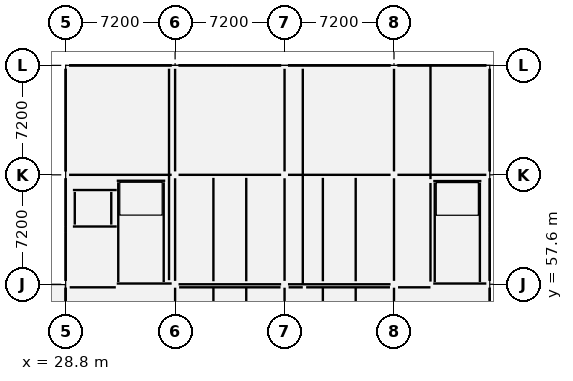
"""IFC4 building model, lengths in metres.
Left out: names, types, materials, properties, quantities, classifications, styles, units other than length and angle.
Written with IfcOpenShell. Run it as: python <this file> out.ifc"""

import sys

from ifc_helpers import new_model, si_unit, direction, frame, frame_2d, origin, origin_2d, place, context, subcontext, project, spatial, rectangle, extrude, element, fill, save


model = new_model("IFC4")
c1 = context("Model", 3, precision=1e-05, world=origin(), true_north=direction((0.0, 1.0)))
c2 = subcontext(c1, "Body", "Model", "MODEL_VIEW")
j1 = project(units=[si_unit("LENGTHUNIT", "METRE"), si_unit("PLANEANGLEUNIT", "RADIAN")], contexts=[c1])
p1 = place(None, origin())
s1 = spatial("IfcSite", under=j1, at=p1, CompositionType="ELEMENT")
p2 = place(p1, origin())
s2 = spatial("IfcBuilding", under=s1, at=p2, CompositionType="ELEMENT")
p3 = place(p2, frame((0.0, 0.0, 5.4)))
s3 = spatial("IfcBuildingStorey", under=s2, at=p3, CompositionType="ELEMENT", Elevation=5.4)
for number, where, z_axis, x_axis in (
    (1, (28.8, 57.6, 0.0), (0.0, 0.0, 1.0), (1.0, 0.0, 0.0)),
    (2, (28.8, 64.8, 0.0), (0.0, 0.0, 1.0), (1.0, 0.0, 0.0)),
    (3, (28.8, 72.0, 0.0), (0.0, 0.0, 1.0), (1.0, 0.0, 0.0)),
    (4, (36.0, 57.6, 0.0), (0.0, 0.0, 1.0), (1.0, 0.0, 0.0)),
    (5, (36.0, 64.8, 0.0), (0.0, 0.0, 1.0), (1.0, 0.0, 0.0)),
    (6, (36.0, 72.0, 0.0), (0.0, 0.0, 1.0), (1.0, 0.0, 0.0)),
    (7, (43.2, 57.6, 0.0), (0.0, 0.0, 1.0), (1.0, 0.0, 0.0)),
    (8, (43.2, 64.8, 0.0), (0.0, 0.0, 1.0), (1.0, 0.0, 0.0)),
    (9, (43.2, 72.0, 0.0), (0.0, 0.0, 1.0), (1.0, 0.0, 0.0)),
    (10, (50.4, 57.6, 0.0), (0.0, 0.0, 1.0), (1.0, 0.0, 0.0)),
    (11, (50.4, 64.8, 0.0), (0.0, 0.0, 1.0), (1.0, 0.0, 0.0)),
    (12, (50.4, 72.0, 0.0), (0.0, 0.0, 1.0), (1.0, 0.0, 0.0)),
    (13, (56.7, 57.6, 0.0), (0.0, 0.0, 1.0), (1.0, 0.0, 0.0)),
    (14, (56.7, 64.8, 0.0), (0.0, 0.0, 1.0), (1.0, 0.0, 0.0)),
    (15, (56.7, 72.0, 0.0), (0.0, 0.0, 1.0), (1.0, 0.0, 0.0)),
):
    element("IfcColumn", number, at=place(p3, frame(where, z_axis=z_axis, x_axis=x_axis)), inside=s3, PredefinedType="COLUMN", context=c2, shape_type="SweptSolid", body=[
        extrude(rectangle(XDim=0.45, YDim=0.45, at=origin_2d()), origin(), (0.0, 0.0, 1.0), 4.2),
    ])
p4 = place(p3, frame((29.275, 61.4, 0.0), z_axis=(0.0, 0.0, 1.0), x_axis=(1.0, 0.0, 0.0)))
e16 = element("IfcWall", 16, at=p4, inside=s3, PredefinedType="SHEAR", context=c2, shape_type="SweptSolid", body=[
    extrude(rectangle(XDim=2.885, YDim=0.25, at=frame_2d((1.442, 0.0))), origin(), (0.0, 0.0, 1.0), 3.95),
])
p5 = place(p4, frame((0.942, 0.0, 0.0)))
e17 = element("IfcOpeningElement", 17, at=p5, cuts=e16, PredefinedType="OPENING", context=c2, shape_type="SweptSolid", body=[
    extrude(rectangle(XDim=1.0, YDim=2.1, at=frame_2d((0.5, 1.05))), frame((0.0, 0.137, 0.0), z_axis=(0.0, -1.0, 0.0), x_axis=(1.0, 0.0, 0.0)), (0.0, 0.0, 1.0), 0.274),
])
p6 = place(p3, frame((29.275, 63.8, 0.0), z_axis=(0.0, 0.0, 1.0), x_axis=(1.0, 0.0, 0.0)))
e18 = element("IfcWall", 18, at=p6, inside=s3, PredefinedType="SHEAR", context=c2, shape_type="SweptSolid", body=[
    extrude(rectangle(XDim=2.885, YDim=0.25, at=frame_2d((1.442, 0.0))), origin(), (0.0, 0.0, 1.0), 3.95),
])
for number, where, z_axis, x_axis in (
    (19, (29.4, 61.525, 0.0), (0.0, 0.0, 1.0), (0.0, 1.0, 0.0)),
    (20, (31.8, 61.525, 0.0), (0.0, 0.0, 1.0), (0.0, 1.0, 0.0)),
):
    element("IfcWall", number, at=place(p3, frame(where, z_axis=z_axis, x_axis=x_axis)), inside=s3, PredefinedType="SHEAR", context=c2, shape_type="SweptSolid", body=[
        extrude(rectangle(XDim=2.15, YDim=0.25, at=frame_2d((1.075, 0.0))), origin(), (0.0, 0.0, 1.0), 3.95),
    ])
p7 = place(p3, frame((32.16, 57.65, 0.0), z_axis=(0.0, 0.0, 1.0), x_axis=(1.0, 0.0, 0.0)))
e21 = element("IfcWall", 21, at=p7, inside=s3, PredefinedType="SHEAR", context=c2, shape_type="SweptSolid", body=[
    extrude(rectangle(XDim=3.615, YDim=0.2, at=frame_2d((1.808, 0.0))), origin(), (0.0, 0.0, 1.0), 3.95),
])
p8 = place(p7, frame((1.258, 0.0, 0.0)))
e22 = element("IfcOpeningElement", 22, at=p8, cuts=e21, PredefinedType="OPENING", context=c2, shape_type="SweptSolid", body=[
    extrude(rectangle(XDim=1.1, YDim=2.15, at=frame_2d((0.55, 1.075))), frame((0.0, 0.112, 0.0), z_axis=(0.0, -1.0, 0.0), x_axis=(1.0, 0.0, 0.0)), (0.0, 0.0, 1.0), 0.224),
])
p9 = place(p3, frame((32.16, 64.41, 0.0), z_axis=(0.0, 0.0, 1.0), x_axis=(1.0, 0.0, 0.0)))
e23 = element("IfcWall", 23, at=p9, inside=s3, PredefinedType="SHEAR", context=c2, shape_type="SweptSolid", body=[
    extrude(rectangle(XDim=3.19, YDim=0.2, at=frame_2d((1.595, 0.0))), origin(), (0.0, 0.0, 1.0), 3.95),
])
for number, where, z_axis, x_axis in (
    (24, (32.26, 57.75, 0.0), (0.0, 0.0, 1.0), (0.0, 1.0, 0.0)),
    (25, (35.25, 57.75, 0.0), (0.0, 0.0, 1.0), (0.0, 1.0, 0.0)),
):
    element("IfcWall", number, at=place(p3, frame(where, z_axis=z_axis, x_axis=x_axis)), inside=s3, PredefinedType="SHEAR", context=c2, shape_type="SweptSolid", body=[
        extrude(rectangle(XDim=6.56, YDim=0.2, at=frame_2d((3.28, 0.0))), origin(), (0.0, 0.0, 1.0), 3.95),
    ])
p10 = place(p3, frame((52.98, 57.65, 0.0), z_axis=(0.0, 0.0, 1.0), x_axis=(1.0, 0.0, 0.0)))
e26 = element("IfcWall", 26, at=p10, inside=s3, PredefinedType="SHEAR", context=c2, shape_type="SweptSolid", body=[
    extrude(rectangle(XDim=3.495, YDim=0.2, at=frame_2d((1.748, 0.0))), origin(), (0.0, 0.0, 1.0), 3.95),
])
p11 = place(p10, frame((1.198, 0.0, 0.0)))
e27 = element("IfcOpeningElement", 27, at=p11, cuts=e26, PredefinedType="OPENING", context=c2, shape_type="SweptSolid", body=[
    extrude(rectangle(XDim=1.1, YDim=2.15, at=frame_2d((0.55, 1.075))), frame((0.0, 0.112, 0.0), z_axis=(0.0, -1.0, 0.0), x_axis=(1.0, 0.0, 0.0)), (0.0, 0.0, 1.0), 0.224),
])
p12 = place(p3, frame((52.98, 64.39, 0.0), z_axis=(0.0, 0.0, 1.0), x_axis=(1.0, 0.0, 0.0)))
e28 = element("IfcWall", 28, at=p12, inside=s3, PredefinedType="SHEAR", context=c2, shape_type="SweptSolid", body=[
    extrude(rectangle(XDim=3.17, YDim=0.2, at=frame_2d((1.585, 0.0))), origin(), (0.0, 0.0, 1.0), 3.95),
])
for number, where, z_axis, x_axis in (
    (29, (53.08, 57.75, 0.0), (0.0, 0.0, 1.0), (0.0, 1.0, 0.0)),
    (30, (56.05, 57.75, 0.0), (0.0, 0.0, 1.0), (0.0, 1.0, 0.0)),
):
    element("IfcWall", number, at=place(p3, frame(where, z_axis=z_axis, x_axis=x_axis)), inside=s3, PredefinedType="SHEAR", context=c2, shape_type="SweptSolid", body=[
        extrude(rectangle(XDim=6.54, YDim=0.2, at=frame_2d((3.27, 0.0))), origin(), (0.0, 0.0, 1.0), 3.95),
    ])
p13 = place(p3, frame((56.7, 61.0, 0.0), z_axis=(0.0, 0.0, 1.0), x_axis=(0.0, 1.0, 0.0)))
e31 = element("IfcWall", 31, at=p13, inside=s3, PredefinedType="SOLIDWALL", context=c2, shape_type="SweptSolid", body=[
    extrude(rectangle(XDim=0.4, YDim=0.36, at=frame_2d((0.2, 0.0))), origin(), (0.0, 0.0, 1.0), 3.34),
])
p14 = place(p3, frame((56.7, 68.2, 0.0), z_axis=(0.0, 0.0, 1.0), x_axis=(0.0, 1.0, 0.0)))
e32 = element("IfcWall", 32, at=p14, inside=s3, PredefinedType="SOLIDWALL", context=c2, shape_type="SweptSolid", body=[
    extrude(rectangle(XDim=0.4, YDim=0.36, at=frame_2d((0.2, 0.0))), origin(), (0.0, 0.0, 1.0), 3.29),
])
p15 = place(p3, frame((53.75, 72.0, 0.0), z_axis=(0.0, 0.0, 1.0), x_axis=(-1.0, 0.0, 0.0)))
e33 = element("IfcWall", 33, at=p15, inside=s3, PredefinedType="SOLIDWALL", context=c2, shape_type="SweptSolid", body=[
    extrude(rectangle(XDim=0.4, YDim=0.36, at=frame_2d((0.2, 0.0))), origin(), (0.0, 0.0, 1.0), 3.29),
])
p16 = place(p3, frame((50.175, 72.0, 0.0), z_axis=(0.0, 0.0, 1.0), x_axis=(-1.0, 0.0, 0.0)))
e34 = element("IfcWall", 34, at=p16, inside=s3, PredefinedType="ELEMENTEDWALL", context=c2, shape_type="SweptSolid", body=[
    extrude(rectangle(XDim=6.75, YDim=0.32, at=frame_2d((3.375, 0.0))), origin(), (0.0, 0.0, 1.0), 3.29),
])
p17 = place(p16, frame((2.775, 0.0, 0.85)))
e35 = element("IfcOpeningElement", 35, at=p17, cuts=e34, PredefinedType="OPENING", context=c2, shape_type="SweptSolid", body=[
    extrude(rectangle(XDim=1.2, YDim=2.2, at=frame_2d((0.6, 1.1))), frame((0.0, 0.172, 0.0), z_axis=(0.0, -1.0, 0.0), x_axis=(1.0, 0.0, 0.0)), (0.0, 0.0, 1.0), 0.344),
])
p18 = place(p3, frame((39.8, 72.0, 0.0), z_axis=(0.0, 0.0, 1.0), x_axis=(-1.0, 0.0, 0.0)))
e36 = element("IfcWall", 36, at=p18, inside=s3, PredefinedType="SOLIDWALL", context=c2, shape_type="SweptSolid", body=[
    extrude(rectangle(XDim=0.4, YDim=0.36, at=frame_2d((0.2, 0.0))), origin(), (0.0, 0.0, 1.0), 3.29),
])
p19 = place(p3, frame((35.775, 72.0, 0.0), z_axis=(0.0, 0.0, 1.0), x_axis=(-1.0, 0.0, 0.0)))
e37 = element("IfcWall", 37, at=p19, inside=s3, PredefinedType="ELEMENTEDWALL", context=c2, shape_type="SweptSolid", body=[
    extrude(rectangle(XDim=6.75, YDim=0.32, at=frame_2d((3.375, 0.0))), origin(), (0.0, 0.0, 1.0), 3.29),
])
p20 = place(p19, frame((2.475, 0.0, 0.85)))
e38 = element("IfcOpeningElement", 38, at=p20, cuts=e37, PredefinedType="OPENING", context=c2, shape_type="SweptSolid", body=[
    extrude(rectangle(XDim=1.8, YDim=2.2, at=frame_2d((0.9, 1.1))), frame((0.0, 0.172, 0.0), z_axis=(0.0, -1.0, 0.0), x_axis=(1.0, 0.0, 0.0)), (0.0, 0.0, 1.0), 0.344),
])
p21 = place(p3, frame((28.8, 68.6, 0.0), z_axis=(0.0, 0.0, 1.0), x_axis=(0.0, -1.0, 0.0)))
e39 = element("IfcWall", 39, at=p21, inside=s3, PredefinedType="SOLIDWALL", context=c2, shape_type="SweptSolid", body=[
    extrude(rectangle(XDim=0.4, YDim=0.36, at=frame_2d((0.2, 0.0))), origin(), (0.0, 0.0, 1.0), 3.29),
])
p22 = place(p3, frame((28.8, 61.4, 0.0), z_axis=(0.0, 0.0, 1.0), x_axis=(0.0, -1.0, 0.0)))
e40 = element("IfcWall", 40, at=p22, inside=s3, PredefinedType="SOLIDWALL", context=c2, shape_type="SweptSolid", body=[
    extrude(rectangle(XDim=0.4, YDim=0.36, at=frame_2d((0.2, 0.0))), origin(), (0.0, 0.0, 1.0), 3.34),
])
p23 = place(p3, frame((28.8, 57.375, 0.0), z_axis=(0.0, 0.0, 1.0), x_axis=(0.0, -1.0, 0.0)))
e41 = element("IfcWall", 41, at=p23, inside=s3, PredefinedType="ELEMENTEDWALL", context=c2, shape_type="SweptSolid", body=[
    extrude(rectangle(XDim=6.75, YDim=0.32, at=frame_2d((3.375, 0.0))), origin(), (0.0, 0.0, 1.0), 3.29),
])
p24 = place(p23, frame((4.515, 0.0, 0.0)))
e42 = element("IfcOpeningElement", 42, at=p24, cuts=e41, PredefinedType="OPENING", context=c2, shape_type="SweptSolid", body=[
    extrude(rectangle(XDim=1.5, YDim=2.2, at=frame_2d((0.75, 1.1))), frame((0.0, 0.172, 0.0), z_axis=(0.0, -1.0, 0.0), x_axis=(1.0, 0.0, 0.0)), (0.0, 0.0, 1.0), 0.344),
])
p25 = place(p3, frame((29.065, 57.4, 0.0), z_axis=(0.0, 0.0, 1.0), x_axis=(1.0, 0.0, 0.0)))
e43 = element("IfcWall", 43, at=p25, inside=s3, PredefinedType="STANDARD", context=c2, shape_type="SweptSolid", body=[
    extrude(rectangle(XDim=3.035, YDim=0.22, at=frame_2d((1.518, 0.0))), origin(), (0.0, 0.0, 1.0), 3.92),
])
p26 = place(p25, frame((0.917, 0.0, 0.0)))
e44 = element("IfcOpeningElement", 44, at=p26, cuts=e43, PredefinedType="OPENING", context=c2, shape_type="SweptSolid", body=[
    extrude(rectangle(XDim=1.2, YDim=2.2, at=frame_2d((0.6, 1.1))), frame((0.0, 0.122, 0.0), z_axis=(0.0, -1.0, 0.0), x_axis=(1.0, 0.0, 0.0)), (0.0, 0.0, 1.0), 0.244),
])
p27 = place(p3, frame((36.265, 57.4, 0.0), z_axis=(0.0, 0.0, 1.0), x_axis=(1.0, 0.0, 0.0)))
e45 = element("IfcWall", 45, at=p27, inside=s3, PredefinedType="STANDARD", context=c2, shape_type="SweptSolid", body=[
    extrude(rectangle(XDim=6.67, YDim=0.15, at=frame_2d((3.335, 0.0))), origin(), (0.0, 0.0, 1.0), 3.238),
])
p28 = place(p27, frame((2.81, 0.0, 0.0)))
e46 = element("IfcOpeningElement", 46, at=p28, cuts=e45, PredefinedType="OPENING", context=c2, shape_type="SweptSolid", body=[
    extrude(rectangle(XDim=1.05, YDim=2.15, at=frame_2d((0.525, 1.075))), frame((0.0, 0.087, 0.0), z_axis=(0.0, -1.0, 0.0), x_axis=(1.0, 0.0, 0.0)), (0.0, 0.0, 1.0), 0.174),
])
p29 = place(p3, frame((43.465, 57.4, 0.0), z_axis=(0.0, 0.0, 1.0), x_axis=(1.0, 0.0, 0.0)))
e47 = element("IfcWall", 47, at=p29, inside=s3, PredefinedType="STANDARD", context=c2, shape_type="SweptSolid", body=[
    extrude(rectangle(XDim=0.935, YDim=0.15, at=frame_2d((0.467, 0.0))), origin(), (0.0, 0.0, 1.0), 3.188),
])
p30 = place(p3, frame((44.4, 57.62, 0.0), z_axis=(0.0, 0.0, 1.0), x_axis=(0.0, 1.0, 0.0)))
e48 = element("IfcWall", 48, at=p30, inside=s3, PredefinedType="STANDARD", context=c2, shape_type="SweptSolid", body=[
    extrude(rectangle(XDim=14.16, YDim=0.15, at=frame_2d((7.08, 0.0))), origin(), (0.0, 0.0, 1.0), 3.188),
])
p31 = place(p3, frame((35.6, 57.87, 0.0), z_axis=(0.0, 0.0, 1.0), x_axis=(0.0, 1.0, 0.0)))
e49 = element("IfcWall", 49, at=p31, inside=s3, PredefinedType="STANDARD", context=c2, shape_type="SweptSolid", body=[
    extrude(rectangle(XDim=13.91, YDim=0.15, at=frame_2d((6.955, 0.0))), origin(), (0.0, 0.0, 1.0), 3.238),
])
p32 = place(p3, frame((44.62, 57.4, 0.0), z_axis=(0.0, 0.0, 1.0), x_axis=(1.0, 0.0, 0.0)))
e50 = element("IfcWall", 50, at=p32, inside=s3, PredefinedType="PARTITIONING", context=c2, shape_type="SweptSolid", body=[
    extrude(rectangle(XDim=5.515, YDim=0.1, at=frame_2d((2.757, 0.0))), origin(), (0.0, 0.0, 1.0), 3.188),
])
p33 = place(p32, frame((2.232, 0.0, 0.0)))
e51 = element("IfcOpeningElement", 51, at=p33, cuts=e50, PredefinedType="OPENING", context=c2, shape_type="SweptSolid", body=[
    extrude(rectangle(XDim=1.05, YDim=2.15, at=frame_2d((0.525, 1.075))), frame((0.0, 0.062, 0.0), z_axis=(0.0, -1.0, 0.0), x_axis=(1.0, 0.0, 0.0)), (0.0, 0.0, 1.0), 0.124),
])
p34 = place(p3, frame((50.665, 57.4, 0.0), z_axis=(0.0, 0.0, 1.0), x_axis=(1.0, 0.0, 0.0)))
e52 = element("IfcWall", 52, at=p34, inside=s3, PredefinedType="PARTITIONING", context=c2, shape_type="SweptSolid", body=[
    extrude(rectangle(XDim=2.135, YDim=0.1, at=frame_2d((1.067, 0.0))), origin(), (0.0, 0.0, 1.0), 3.92),
])
p35 = place(p3, frame((52.8, 57.776, 0.0), z_axis=(0.0, 0.0, 1.0), x_axis=(0.0, 1.0, 0.0)))
e53 = element("IfcWall", 53, at=p35, inside=s3, PredefinedType="PARTITIONING", context=c2, shape_type="SweptSolid", body=[
    extrude(rectangle(XDim=6.488, YDim=0.1, at=frame_2d((3.244, 0.0))), origin(), (0.0, 0.0, 1.0), 3.92),
])
p36 = place(p3, frame((52.8, 64.516, 0.0), z_axis=(0.0, 0.0, 1.0), x_axis=(0.0, 1.0, 0.0)))
e54 = element("IfcWall", 54, at=p36, inside=s3, PredefinedType="PARTITIONING", context=c2, shape_type="SweptSolid", body=[
    extrude(rectangle(XDim=7.484, YDim=0.1, at=frame_2d((3.742, 0.0))), origin(), (0.0, 0.0, 1.0), 3.188),
])
p37 = place(p17, origin())
e55 = element("IfcWindow", 55, at=p37, inside=s3, PartitioningType="SINGLE_PANEL", PredefinedType="WINDOW", context=c2, shape_type="SweptSolid", body=[
    extrude(rectangle(XDim=1.2, YDim=2.2, at=frame_2d((0.6, 1.1))), frame((0.0, 0.03, 0.0), z_axis=(0.0, -1.0, 0.0), x_axis=(1.0, 0.0, 0.0)), (0.0, 0.0, 1.0), 0.06),
])
fill(e35, e55)
p38 = place(p20, origin())
e56 = element("IfcWindow", 56, at=p38, inside=s3, PartitioningType="SINGLE_PANEL", PredefinedType="WINDOW", context=c2, shape_type="SweptSolid", body=[
    extrude(rectangle(XDim=1.8, YDim=2.2, at=frame_2d((0.9, 1.1))), frame((0.0, 0.03, 0.0), z_axis=(0.0, -1.0, 0.0), x_axis=(1.0, 0.0, 0.0)), (0.0, 0.0, 1.0), 0.06),
])
fill(e38, e56)
p39 = place(p8, origin())
e57 = element("IfcDoor", 57, at=p39, inside=s3, OperationType="SINGLE_SWING_RIGHT", PredefinedType="DOOR", context=c2, shape_type="SweptSolid", body=[
    extrude(rectangle(XDim=1.1, YDim=2.15, at=frame_2d((0.55, 1.075))), frame((0.0, 0.025, 0.0), z_axis=(0.0, -1.0, 0.0), x_axis=(1.0, 0.0, 0.0)), (0.0, 0.0, 1.0), 0.05),
])
fill(e22, e57)
p40 = place(p11, origin())
e58 = element("IfcDoor", 58, at=p40, inside=s3, OperationType="SINGLE_SWING_LEFT", PredefinedType="DOOR", context=c2, shape_type="SweptSolid", body=[
    extrude(rectangle(XDim=1.1, YDim=2.15, at=frame_2d((0.55, 1.075))), frame((0.0, 0.025, 0.0), z_axis=(0.0, -1.0, 0.0), x_axis=(1.0, 0.0, 0.0)), (0.0, 0.0, 1.0), 0.05),
])
fill(e27, e58)
p41 = place(p5, origin())
e59 = element("IfcDoor", 59, at=p41, inside=s3, OperationType="SLIDING_TO_RIGHT", PredefinedType="DOOR", context=c2, shape_type="SweptSolid", body=[
    extrude(rectangle(XDim=1.0, YDim=2.1, at=frame_2d((0.5, 1.05))), frame((0.0, 0.025, 0.0), z_axis=(0.0, -1.0, 0.0), x_axis=(1.0, 0.0, 0.0)), (0.0, 0.0, 1.0), 0.05),
])
fill(e17, e59)
p42 = place(p26, origin())
e60 = element("IfcDoor", 60, at=p42, inside=s3, OperationType="SINGLE_SWING_RIGHT", PredefinedType="DOOR", context=c2, shape_type="SweptSolid", body=[
    extrude(rectangle(XDim=1.2, YDim=2.2, at=frame_2d((0.6, 1.1))), frame((0.0, 0.025, 0.0), z_axis=(0.0, -1.0, 0.0), x_axis=(1.0, 0.0, 0.0)), (0.0, 0.0, 1.0), 0.05),
])
fill(e44, e60)
p43 = place(p28, origin())
e61 = element("IfcDoor", 61, at=p43, inside=s3, OperationType="SINGLE_SWING_LEFT", PredefinedType="DOOR", context=c2, shape_type="SweptSolid", body=[
    extrude(rectangle(XDim=1.05, YDim=2.15, at=frame_2d((0.525, 1.075))), frame((0.0, 0.025, 0.0), z_axis=(0.0, -1.0, 0.0), x_axis=(1.0, 0.0, 0.0)), (0.0, 0.0, 1.0), 0.05),
])
fill(e46, e61)
p44 = place(p33, origin())
e62 = element("IfcDoor", 62, at=p44, inside=s3, OperationType="SINGLE_SWING_RIGHT", PredefinedType="DOOR", context=c2, shape_type="SweptSolid", body=[
    extrude(rectangle(XDim=1.05, YDim=2.15, at=frame_2d((0.525, 1.075))), frame((0.0, 0.025, 0.0), z_axis=(0.0, -1.0, 0.0), x_axis=(1.0, 0.0, 0.0)), (0.0, 0.0, 1.0), 0.05),
])
fill(e51, e62)
save(model, sys.argv[1])
